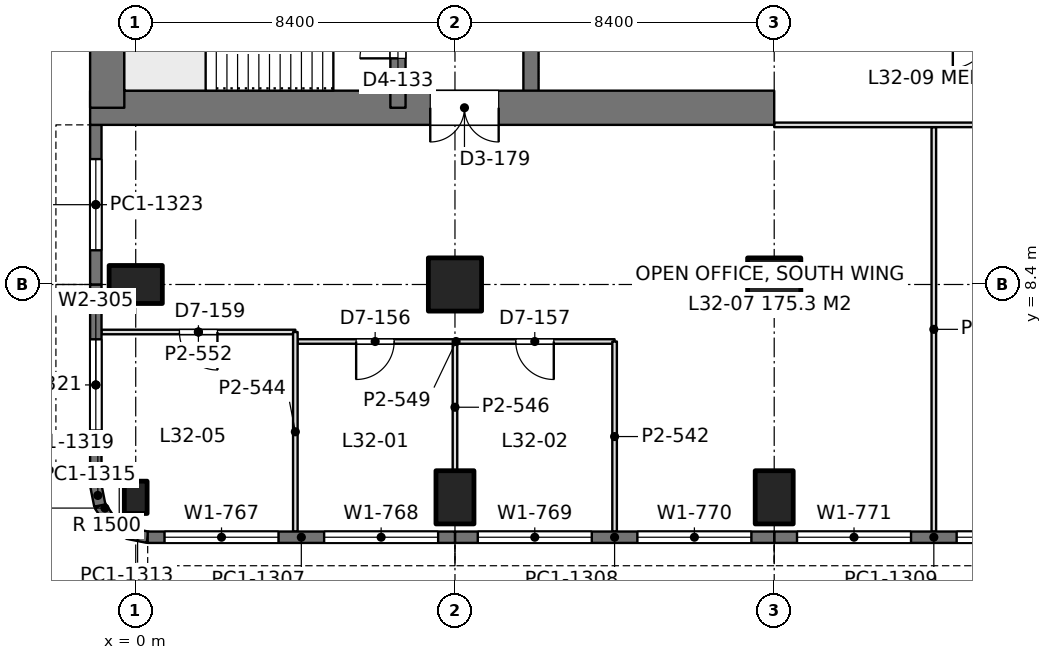
"""IFC4 building model, lengths in metres.
Left out: names, types, materials, properties, quantities, classifications, styles, units other than length and angle.
Written with IfcOpenShell. Run it as: python <this file> out.ifc"""

import sys

from ifc_helpers import new_model, si_unit, direction, frame, frame_2d, origin, origin_2d, place, context, subcontext, project, spatial, rectangle, extrude, element, fill, save


model = new_model("IFC4")
c1 = context("Model", 3, precision=1e-05, world=origin(), true_north=direction((0.0, 1.0)))
c2 = subcontext(c1, "Body", "Model", "MODEL_VIEW")
j1 = project(units=[si_unit("LENGTHUNIT", "METRE"), si_unit("PLANEANGLEUNIT", "RADIAN")], contexts=[c1])
p1 = place(None, origin())
s1 = spatial("IfcSite", under=j1, at=p1, CompositionType="ELEMENT")
p2 = place(p1, origin())
s2 = spatial("IfcBuilding", under=s1, at=p2, CompositionType="ELEMENT")
p3 = place(p2, frame((0.0, 0.0, 142.8)))
s3 = spatial("IfcBuildingStorey", under=s2, at=p3, CompositionType="ELEMENT", Elevation=142.8)
p4 = place(p3, frame((0.0, 2.8, 0.0), z_axis=(0.0, 0.0, 1.0), x_axis=(1.0, 0.0, 0.0)))
e1 = element("IfcColumn", 1, at=p4, inside=s3, PredefinedType="COLUMN", context=c2, shape_type="SweptSolid", body=[
    extrude(rectangle(XDim=0.6, YDim=0.85, at=origin_2d()), origin(), (0.0, 0.0, 1.0), 4.2),
])
for number, where, z_axis, x_axis in (
    (2, (0.0, 8.4, 0.0), (0.0, 0.0, 1.0), (0.0, 1.0, 0.0)),
    (3, (8.4, 2.8, 0.0), (0.0, 0.0, 1.0), (1.0, 0.0, 0.0)),
):
    element("IfcColumn", number, at=place(p3, frame(where, z_axis=z_axis, x_axis=x_axis)), inside=s3, PredefinedType="COLUMN", context=c2, shape_type="SweptSolid", body=[
        extrude(rectangle(XDim=1.0, YDim=1.4, at=origin_2d()), origin(), (0.0, 0.0, 1.0), 4.2),
    ])
p5 = place(p3, frame((8.4, 8.4, 0.0), z_axis=(0.0, 0.0, 1.0), x_axis=(1.0, 0.0, 0.0)))
e4 = element("IfcColumn", 4, at=p5, inside=s3, PredefinedType="COLUMN", context=c2, shape_type="SweptSolid", body=[
    extrude(rectangle(XDim=1.4, YDim=1.4, at=origin_2d()), origin(), (0.0, 0.0, 1.0), 4.2),
])
p6 = place(p3, frame((16.8, 2.8, 0.0), z_axis=(0.0, 0.0, 1.0), x_axis=(1.0, 0.0, 0.0)))
e5 = element("IfcColumn", 5, at=p6, inside=s3, PredefinedType="COLUMN", context=c2, shape_type="SweptSolid", body=[
    extrude(rectangle(XDim=1.0, YDim=1.4, at=origin_2d()), origin(), (0.0, 0.0, 1.0), 4.2),
])
p7 = place(p3, frame((16.8, 8.4, 0.0), z_axis=(0.0, 0.0, 1.0), x_axis=(1.0, 0.0, 0.0)))
e6 = element("IfcColumn", 6, at=p7, inside=s3, PredefinedType="COLUMN", context=c2, shape_type="SweptSolid", body=[
    extrude(rectangle(XDim=1.4, YDim=1.4, at=origin_2d()), origin(), (0.0, 0.0, 1.0), 4.2),
])
p8 = place(p3, frame((-1.2, 13.05, 0.0), z_axis=(0.0, 0.0, 1.0), x_axis=(1.0, 0.0, 0.0)))
e7 = element("IfcWall", 7, at=p8, inside=s3, PredefinedType="SHEAR", context=c2, shape_type="SweptSolid", body=[
    extrude(rectangle(XDim=18.0, YDim=0.9, at=frame_2d((9.0, 0.0))), origin(), (0.0, 0.0, 1.0), 4.2),
])
p9 = place(p8, frame((8.95, 0.0, 0.0)))
e8 = element("IfcOpeningElement", 8, at=p9, cuts=e7, PredefinedType="OPENING", context=c2, shape_type="SweptSolid", body=[
    extrude(rectangle(XDim=1.8, YDim=2.4, at=frame_2d((0.9, 1.2))), frame((0.0, 0.46, 0.0), z_axis=(0.0, -1.0, 0.0), x_axis=(1.0, 0.0, 0.0)), (0.0, 0.0, 1.0), 0.92),
])
p10 = place(p3, frame((-0.75, 13.05, 0.0), z_axis=(0.0, 0.0, 1.0), x_axis=(0.0, 1.0, 0.0)))
e9 = element("IfcWall", 9, at=p10, inside=s3, PredefinedType="SHEAR", context=c2, shape_type="SweptSolid", body=[
    extrude(rectangle(XDim=24.3, YDim=0.9, at=frame_2d((12.15, 0.0))), origin(), (0.0, 0.0, 1.0), 4.2),
])
p11 = place(p3, frame((6.9, 13.05, 0.0), z_axis=(0.0, 0.0, 1.0), x_axis=(0.0, 1.0, 0.0)))
e10 = element("IfcWall", 10, at=p11, inside=s3, PredefinedType="SHEAR", context=c2, shape_type="SweptSolid", body=[
    extrude(rectangle(XDim=24.3, YDim=0.4, at=frame_2d((12.15, 0.0))), origin(), (0.0, 0.0, 1.0), 4.2),
])
p12 = place(p11, frame((1.3, 0.0, 0.0)))
e11 = element("IfcOpeningElement", 11, at=p12, cuts=e10, PredefinedType="OPENING", context=c2, shape_type="SweptSolid", body=[
    extrude(rectangle(XDim=1.0, YDim=2.2, at=frame_2d((0.5, 1.1))), frame((0.0, 0.21, 0.0), z_axis=(0.0, -1.0, 0.0), x_axis=(1.0, 0.0, 0.0)), (0.0, 0.0, 1.0), 0.42),
])
p13 = place(p11, frame((22.0, 0.0, 0.0)))
e12 = element("IfcOpeningElement", 12, at=p13, cuts=e10, PredefinedType="OPENING", context=c2, shape_type="SweptSolid", body=[
    extrude(rectangle(XDim=1.0, YDim=2.2, at=frame_2d((0.5, 1.1))), frame((0.0, 0.21, 0.0), z_axis=(0.0, -1.0, 0.0), x_axis=(1.0, 0.0, 0.0)), (0.0, 0.0, 1.0), 0.42),
])
p14 = place(p11, frame((5.55, 0.0, 0.0)))
e13 = element("IfcOpeningElement", 13, at=p14, cuts=e10, PredefinedType="OPENING", context=c2, shape_type="SweptSolid", body=[
    extrude(rectangle(XDim=1.0, YDim=2.2, at=frame_2d((0.5, 1.1))), frame((0.0, 0.21, 0.0), z_axis=(0.0, -1.0, 0.0), x_axis=(1.0, 0.0, 0.0)), (0.0, 0.0, 1.0), 0.42),
])
p15 = place(p11, frame((9.55, 0.0, 0.0)))
e14 = element("IfcOpeningElement", 14, at=p15, cuts=e10, PredefinedType="OPENING", context=c2, shape_type="SweptSolid", body=[
    extrude(rectangle(XDim=1.0, YDim=2.2, at=frame_2d((0.5, 1.1))), frame((0.0, 0.21, 0.0), z_axis=(0.0, -1.0, 0.0), x_axis=(1.0, 0.0, 0.0)), (0.0, 0.0, 1.0), 0.42),
])
p16 = place(p11, frame((12.8, 0.0, 0.0)))
e15 = element("IfcOpeningElement", 15, at=p16, cuts=e10, PredefinedType="OPENING", context=c2, shape_type="SweptSolid", body=[
    extrude(rectangle(XDim=1.1, YDim=2.2, at=frame_2d((0.55, 1.1))), frame((0.0, 0.21, 0.0), z_axis=(0.0, -1.0, 0.0), x_axis=(1.0, 0.0, 0.0)), (0.0, 0.0, 1.0), 0.42),
])
p17 = place(p11, frame((15.538, 0.0, 0.0)))
e16 = element("IfcOpeningElement", 16, at=p17, cuts=e10, PredefinedType="OPENING", context=c2, shape_type="SweptSolid", body=[
    extrude(rectangle(XDim=1.1, YDim=2.2, at=frame_2d((0.55, 1.1))), frame((0.0, 0.21, 0.0), z_axis=(0.0, -1.0, 0.0), x_axis=(1.0, 0.0, 0.0)), (0.0, 0.0, 1.0), 0.42),
])
p18 = place(p11, frame((18.262, 0.0, 0.0)))
e17 = element("IfcOpeningElement", 17, at=p18, cuts=e10, PredefinedType="OPENING", context=c2, shape_type="SweptSolid", body=[
    extrude(rectangle(XDim=1.1, YDim=2.2, at=frame_2d((0.55, 1.1))), frame((0.0, 0.21, 0.0), z_axis=(0.0, -1.0, 0.0), x_axis=(1.0, 0.0, 0.0)), (0.0, 0.0, 1.0), 0.42),
])
p19 = place(p3, frame((10.4, 13.05, 0.0), z_axis=(0.0, 0.0, 1.0), x_axis=(0.0, 1.0, 0.0)))
e18 = element("IfcWall", 18, at=p19, inside=s3, PredefinedType="SHEAR", context=c2, shape_type="SweptSolid", body=[
    extrude(rectangle(XDim=24.3, YDim=0.4, at=frame_2d((12.15, 0.0))), origin(), (0.0, 0.0, 1.0), 4.2),
])
p20 = place(p19, frame((10.05, 0.0, 0.0)))
e19 = element("IfcOpeningElement", 19, at=p20, cuts=e18, PredefinedType="OPENING", context=c2, shape_type="SweptSolid", body=[
    extrude(rectangle(XDim=1.1, YDim=2.2, at=frame_2d((0.55, 1.1))), frame((0.0, 0.21, 0.0), z_axis=(0.0, -1.0, 0.0), x_axis=(1.0, 0.0, 0.0)), (0.0, 0.0, 1.0), 0.42),
])
p21 = place(p19, frame((12.9, 0.0, 0.0)))
e20 = element("IfcOpeningElement", 20, at=p21, cuts=e18, PredefinedType="OPENING", context=c2, shape_type="SweptSolid", body=[
    extrude(rectangle(XDim=1.1, YDim=2.2, at=frame_2d((0.55, 1.1))), frame((0.0, 0.21, 0.0), z_axis=(0.0, -1.0, 0.0), x_axis=(1.0, 0.0, 0.0)), (0.0, 0.0, 1.0), 0.42),
])
p22 = place(p19, frame((21.45, 0.0, 0.0)))
e21 = element("IfcOpeningElement", 21, at=p22, cuts=e18, PredefinedType="OPENING", context=c2, shape_type="SweptSolid", body=[
    extrude(rectangle(XDim=1.1, YDim=2.2, at=frame_2d((0.55, 1.1))), frame((0.0, 0.21, 0.0), z_axis=(0.0, -1.0, 0.0), x_axis=(1.0, 0.0, 0.0)), (0.0, 0.0, 1.0), 0.42),
])
p23 = place(p19, frame((2.25, 0.0, 0.0)))
e22 = element("IfcOpeningElement", 22, at=p23, cuts=e18, PredefinedType="OPENING", context=c2, shape_type="SweptSolid", body=[
    extrude(rectangle(XDim=1.8, YDim=2.4, at=frame_2d((0.9, 1.2))), frame((0.0, 0.21, 0.0), z_axis=(0.0, -1.0, 0.0), x_axis=(1.0, 0.0, 0.0)), (0.0, 0.0, 1.0), 0.42),
])
p24 = place(p19, frame((5.8, 0.0, 0.0)))
e23 = element("IfcOpeningElement", 23, at=p24, cuts=e18, PredefinedType="OPENING", context=c2, shape_type="SweptSolid", body=[
    extrude(rectangle(XDim=1.8, YDim=2.4, at=frame_2d((0.9, 1.2))), frame((0.0, 0.21, 0.0), z_axis=(0.0, -1.0, 0.0), x_axis=(1.0, 0.0, 0.0)), (0.0, 0.0, 1.0), 0.42),
])
p25 = place(p3, frame((25.2, 1.75, 0.0), z_axis=(0.0, 0.0, 1.0), x_axis=(-1.0, 0.0, 0.0)))
e24 = element("IfcWall", 24, at=p25, inside=s3, PredefinedType="SOLIDWALL", context=c2, shape_type="SweptSolid", body=[
    extrude(rectangle(XDim=8.4, YDim=0.3, at=frame_2d((4.2, 0.0))), origin(), (0.0, 0.0, 1.0), 4.05),
])
p26 = place(p25, frame((0.6, 0.0, 0.9)))
e25 = element("IfcOpeningElement", 25, at=p26, cuts=e24, PredefinedType="OPENING", context=c2, shape_type="SweptSolid", body=[
    extrude(rectangle(XDim=3.0, YDim=1.9, at=frame_2d((1.5, 0.95))), frame((0.0, 0.16, 0.0), z_axis=(0.0, -1.0, 0.0), x_axis=(1.0, 0.0, 0.0)), (0.0, 0.0, 1.0), 0.32),
])
p27 = place(p25, frame((4.8, 0.0, 0.9)))
e26 = element("IfcOpeningElement", 26, at=p27, cuts=e24, PredefinedType="OPENING", context=c2, shape_type="SweptSolid", body=[
    extrude(rectangle(XDim=3.0, YDim=1.9, at=frame_2d((1.5, 0.95))), frame((0.0, 0.16, 0.0), z_axis=(0.0, -1.0, 0.0), x_axis=(1.0, 0.0, 0.0)), (0.0, 0.0, 1.0), 0.32),
])
p28 = place(p3, frame((16.8, 1.75, 0.0), z_axis=(0.0, 0.0, 1.0), x_axis=(-1.0, 0.0, 0.0)))
e27 = element("IfcWall", 27, at=p28, inside=s3, PredefinedType="SOLIDWALL", context=c2, shape_type="SweptSolid", body=[
    extrude(rectangle(XDim=8.4, YDim=0.3, at=frame_2d((4.2, 0.0))), origin(), (0.0, 0.0, 1.0), 4.05),
])
p29 = place(p28, frame((0.6, 0.0, 0.9)))
e28 = element("IfcOpeningElement", 28, at=p29, cuts=e27, PredefinedType="OPENING", context=c2, shape_type="SweptSolid", body=[
    extrude(rectangle(XDim=3.0, YDim=1.9, at=frame_2d((1.5, 0.95))), frame((0.0, 0.16, 0.0), z_axis=(0.0, -1.0, 0.0), x_axis=(1.0, 0.0, 0.0)), (0.0, 0.0, 1.0), 0.32),
])
p30 = place(p28, frame((4.8, 0.0, 0.9)))
e29 = element("IfcOpeningElement", 29, at=p30, cuts=e27, PredefinedType="OPENING", context=c2, shape_type="SweptSolid", body=[
    extrude(rectangle(XDim=3.0, YDim=1.9, at=frame_2d((1.5, 0.95))), frame((0.0, 0.16, 0.0), z_axis=(0.0, -1.0, 0.0), x_axis=(1.0, 0.0, 0.0)), (0.0, 0.0, 1.0), 0.32),
])
p31 = place(p3, frame((8.4, 1.75, 0.0), z_axis=(0.0, 0.0, 1.0), x_axis=(-1.0, 0.0, 0.0)))
e30 = element("IfcWall", 30, at=p31, inside=s3, PredefinedType="SOLIDWALL", context=c2, shape_type="SweptSolid", body=[
    extrude(rectangle(XDim=8.085, YDim=0.3, at=frame_2d((4.042, 0.0))), origin(), (0.0, 0.0, 1.0), 4.05),
])
p32 = place(p31, frame((0.443, 0.0, 0.9)))
e31 = element("IfcOpeningElement", 31, at=p32, cuts=e30, PredefinedType="OPENING", context=c2, shape_type="SweptSolid", body=[
    extrude(rectangle(XDim=3.0, YDim=1.9, at=frame_2d((1.5, 0.95))), frame((0.0, 0.16, 0.0), z_axis=(0.0, -1.0, 0.0), x_axis=(1.0, 0.0, 0.0)), (0.0, 0.0, 1.0), 0.32),
])
p33 = place(p31, frame((4.643, 0.0, 0.9)))
e32 = element("IfcOpeningElement", 32, at=p33, cuts=e30, PredefinedType="OPENING", context=c2, shape_type="SweptSolid", body=[
    extrude(rectangle(XDim=3.0, YDim=1.9, at=frame_2d((1.5, 0.95))), frame((0.0, 0.16, 0.0), z_axis=(0.0, -1.0, 0.0), x_axis=(1.0, 0.0, 0.0)), (0.0, 0.0, 1.0), 0.32),
])
p34 = place(p3, frame((0.315, 1.75, 0.0), z_axis=(0.0, 0.0, 1.0), x_axis=(-0.980788534345, 0.195073962632, 0.0)))
e33 = element("IfcWall", 33, at=p34, inside=s3, PredefinedType="SOLIDWALL", context=c2, shape_type="SweptSolid", body=[
    extrude(rectangle(XDim=0.541, YDim=0.3, at=frame_2d((0.271, 0.0))), origin(), (0.0, 0.0, 1.0), 4.05),
])
for number, where, z_axis, x_axis in (
    (34, (-0.216, 1.855, 0.0), (0.0, 0.0, 1.0), (-0.831, 0.556, 0.0)),
    (35, (-0.653, 2.147, 0.0), (0.0, 0.0, 1.0), (-0.556, 0.831, 0.0)),
):
    element("IfcWall", number, at=place(p3, frame(where, z_axis=z_axis, x_axis=x_axis)), inside=s3, PredefinedType="SOLIDWALL", context=c2, shape_type="SweptSolid", body=[
        extrude(rectangle(XDim=0.526, YDim=0.3, at=frame_2d((0.263, 0.0))), origin(), (0.0, 0.0, 1.0), 4.05),
    ])
p35 = place(p3, frame((-0.945, 2.584, 0.0), z_axis=(0.0, 0.0, 1.0), x_axis=(-0.195073962632, 0.980788534345, 0.0)))
e36 = element("IfcWall", 36, at=p35, inside=s3, PredefinedType="SOLIDWALL", context=c2, shape_type="SweptSolid", body=[
    extrude(rectangle(XDim=0.541, YDim=0.3, at=frame_2d((0.271, 0.0))), origin(), (0.0, 0.0, 1.0), 4.05),
])
p36 = place(p3, frame((-1.05, 3.115, 0.0), z_axis=(0.0, 0.0, 1.0), x_axis=(0.0, 1.0, 0.0)))
e37 = element("IfcWall", 37, at=p36, inside=s3, PredefinedType="SOLIDWALL", context=c2, shape_type="SweptSolid", body=[
    extrude(rectangle(XDim=5.285, YDim=0.3, at=frame_2d((2.643, 0.0))), origin(), (0.0, 0.0, 1.0), 4.05),
])
p37 = place(p36, frame((1.443, 0.0, 0.9)))
e38 = element("IfcOpeningElement", 38, at=p37, cuts=e37, PredefinedType="OPENING", context=c2, shape_type="SweptSolid", body=[
    extrude(rectangle(XDim=2.4, YDim=1.9, at=frame_2d((1.2, 0.95))), frame((0.0, 0.16, 0.0), z_axis=(0.0, -1.0, 0.0), x_axis=(1.0, 0.0, 0.0)), (0.0, 0.0, 1.0), 0.32),
])
p38 = place(p3, frame((-1.05, 8.4, 0.0), z_axis=(0.0, 0.0, 1.0), x_axis=(0.0, 1.0, 0.0)))
e39 = element("IfcWall", 39, at=p38, inside=s3, PredefinedType="SOLIDWALL", context=c2, shape_type="SweptSolid", body=[
    extrude(rectangle(XDim=4.2, YDim=0.3, at=frame_2d((2.1, 0.0))), origin(), (0.0, 0.0, 1.0), 4.05),
])
p39 = place(p38, frame((0.9, 0.0, 0.9)))
e40 = element("IfcOpeningElement", 40, at=p39, cuts=e39, PredefinedType="OPENING", context=c2, shape_type="SweptSolid", body=[
    extrude(rectangle(XDim=2.4, YDim=1.9, at=frame_2d((1.2, 0.95))), frame((0.0, 0.16, 0.0), z_axis=(0.0, -1.0, 0.0), x_axis=(1.0, 0.0, 0.0)), (0.0, 0.0, 1.0), 0.32),
])
p40 = place(p3, frame((-0.902, 7.15, 0.0), z_axis=(0.0, 0.0, 1.0), x_axis=(1.0, 0.0, 0.0)))
e41 = element("IfcWall", 41, at=p40, inside=s3, PredefinedType="PARTITIONING", context=c2, shape_type="SweptSolid", body=[
    extrude(rectangle(XDim=5.102, YDim=0.12, at=frame_2d((2.551, 0.0))), origin(), (0.0, 0.0, 1.0), 3.56),
])
p41 = place(p40, frame((2.052, 0.0, 0.0)))
e42 = element("IfcOpeningElement", 42, at=p41, cuts=e41, PredefinedType="OPENING", context=c2, shape_type="SweptSolid", body=[
    extrude(rectangle(XDim=1.0, YDim=2.4, at=frame_2d((0.5, 1.2))), frame((0.0, 0.07, 0.0), z_axis=(0.0, -1.0, 0.0), x_axis=(1.0, 0.0, 0.0)), (0.0, 0.0, 1.0), 0.14),
])
p42 = place(p3, frame((4.258, 6.9, 0.0), z_axis=(0.0, 0.0, 1.0), x_axis=(1.0, 0.0, 0.0)))
e43 = element("IfcWall", 43, at=p42, inside=s3, PredefinedType="PARTITIONING", context=c2, shape_type="SweptSolid", body=[
    extrude(rectangle(XDim=8.342, YDim=0.12, at=frame_2d((4.171, 0.0))), origin(), (0.0, 0.0, 1.0), 3.55),
])
p43 = place(p42, frame((1.542, 0.0, 0.0)))
e44 = element("IfcOpeningElement", 44, at=p43, cuts=e43, PredefinedType="OPENING", context=c2, shape_type="SweptSolid", body=[
    extrude(rectangle(XDim=1.0, YDim=2.4, at=frame_2d((0.5, 1.2))), frame((0.0, 0.07, 0.0), z_axis=(0.0, -1.0, 0.0), x_axis=(1.0, 0.0, 0.0)), (0.0, 0.0, 1.0), 0.14),
])
p44 = place(p42, frame((5.742, 0.0, 0.0)))
e45 = element("IfcOpeningElement", 45, at=p44, cuts=e43, PredefinedType="OPENING", context=c2, shape_type="SweptSolid", body=[
    extrude(rectangle(XDim=1.0, YDim=2.4, at=frame_2d((0.5, 1.2))), frame((0.0, 0.07, 0.0), z_axis=(0.0, -1.0, 0.0), x_axis=(1.0, 0.0, 0.0)), (0.0, 0.0, 1.0), 0.14),
])
p45 = place(p3, frame((4.2, 1.898, 0.0), z_axis=(0.0, 0.0, 1.0), x_axis=(0.0, 1.0, 0.0)))
e46 = element("IfcWall", 46, at=p45, inside=s3, PredefinedType="PARTITIONING", context=c2, shape_type="SweptSolid", body=[
    extrude(rectangle(XDim=5.252, YDim=0.12, at=frame_2d((2.626, 0.0))), origin(), (0.0, 0.0, 1.0), 3.56),
])
p46 = place(p3, frame((8.4, 3.499, 0.0), z_axis=(0.0, 0.0, 1.0), x_axis=(0.0, 1.0, 0.0)))
e47 = element("IfcWall", 47, at=p46, inside=s3, PredefinedType="PARTITIONING", context=c2, shape_type="SweptSolid", body=[
    extrude(rectangle(XDim=3.343, YDim=0.12, at=frame_2d((1.671, 0.0))), origin(), (0.0, 0.0, 1.0), 3.55),
])
p47 = place(p3, frame((12.6, 1.898, 0.0), z_axis=(0.0, 0.0, 1.0), x_axis=(0.0, 1.0, 0.0)))
e48 = element("IfcWall", 48, at=p47, inside=s3, PredefinedType="PARTITIONING", context=c2, shape_type="SweptSolid", body=[
    extrude(rectangle(XDim=5.002, YDim=0.12, at=frame_2d((2.501, 0.0))), origin(), (0.0, 0.0, 1.0), 3.56),
])
p48 = place(p3, frame((21.0, 1.898, 0.0), z_axis=(0.0, 0.0, 1.0), x_axis=(0.0, 1.0, 0.0)))
e49 = element("IfcWall", 49, at=p48, inside=s3, PredefinedType="PARTITIONING", context=c2, shape_type="SweptSolid", body=[
    extrude(rectangle(XDim=10.644, YDim=0.12, at=frame_2d((5.322, 0.0))), origin(), (0.0, 0.0, 1.0), 3.55),
])
p49 = place(p3, frame((16.8, 12.6, 0.0), z_axis=(0.0, 0.0, 1.0), x_axis=(1.0, 0.0, 0.0)))
e50 = element("IfcWall", 50, at=p49, inside=s3, PredefinedType="PARTITIONING", context=c2, shape_type="SweptSolid", body=[
    extrude(rectangle(XDim=16.8, YDim=0.12, at=frame_2d((8.4, 0.0))), origin(), (0.0, 0.0, 1.0), 3.55),
])
p50 = place(p26, origin())
e51 = element("IfcWindow", 51, at=p50, inside=s3, PartitioningType="SINGLE_PANEL", PredefinedType="WINDOW", context=c2, shape_type="SweptSolid", body=[
    extrude(rectangle(XDim=3.0, YDim=1.9, at=frame_2d((1.5, 0.95))), frame((0.0, 0.03, 0.0), z_axis=(0.0, -1.0, 0.0), x_axis=(1.0, 0.0, 0.0)), (0.0, 0.0, 1.0), 0.06),
])
fill(e25, e51)
p51 = place(p27, origin())
e52 = element("IfcWindow", 52, at=p51, inside=s3, PartitioningType="SINGLE_PANEL", PredefinedType="WINDOW", context=c2, shape_type="SweptSolid", body=[
    extrude(rectangle(XDim=3.0, YDim=1.9, at=frame_2d((1.5, 0.95))), frame((0.0, 0.03, 0.0), z_axis=(0.0, -1.0, 0.0), x_axis=(1.0, 0.0, 0.0)), (0.0, 0.0, 1.0), 0.06),
])
fill(e26, e52)
p52 = place(p29, origin())
e53 = element("IfcWindow", 53, at=p52, inside=s3, PartitioningType="SINGLE_PANEL", PredefinedType="WINDOW", context=c2, shape_type="SweptSolid", body=[
    extrude(rectangle(XDim=3.0, YDim=1.9, at=frame_2d((1.5, 0.95))), frame((0.0, 0.03, 0.0), z_axis=(0.0, -1.0, 0.0), x_axis=(1.0, 0.0, 0.0)), (0.0, 0.0, 1.0), 0.06),
])
fill(e28, e53)
p53 = place(p30, origin())
e54 = element("IfcWindow", 54, at=p53, inside=s3, PartitioningType="SINGLE_PANEL", PredefinedType="WINDOW", context=c2, shape_type="SweptSolid", body=[
    extrude(rectangle(XDim=3.0, YDim=1.9, at=frame_2d((1.5, 0.95))), frame((0.0, 0.03, 0.0), z_axis=(0.0, -1.0, 0.0), x_axis=(1.0, 0.0, 0.0)), (0.0, 0.0, 1.0), 0.06),
])
fill(e29, e54)
p54 = place(p32, origin())
e55 = element("IfcWindow", 55, at=p54, inside=s3, PartitioningType="SINGLE_PANEL", PredefinedType="WINDOW", context=c2, shape_type="SweptSolid", body=[
    extrude(rectangle(XDim=3.0, YDim=1.9, at=frame_2d((1.5, 0.95))), frame((0.0, 0.03, 0.0), z_axis=(0.0, -1.0, 0.0), x_axis=(1.0, 0.0, 0.0)), (0.0, 0.0, 1.0), 0.06),
])
fill(e31, e55)
p55 = place(p33, origin())
e56 = element("IfcWindow", 56, at=p55, inside=s3, PartitioningType="SINGLE_PANEL", PredefinedType="WINDOW", context=c2, shape_type="SweptSolid", body=[
    extrude(rectangle(XDim=3.0, YDim=1.9, at=frame_2d((1.5, 0.95))), frame((0.0, 0.03, 0.0), z_axis=(0.0, -1.0, 0.0), x_axis=(1.0, 0.0, 0.0)), (0.0, 0.0, 1.0), 0.06),
])
fill(e32, e56)
p56 = place(p37, origin())
e57 = element("IfcWindow", 57, at=p56, inside=s3, PartitioningType="SINGLE_PANEL", PredefinedType="WINDOW", context=c2, shape_type="SweptSolid", body=[
    extrude(rectangle(XDim=2.4, YDim=1.9, at=frame_2d((1.2, 0.95))), frame((0.0, 0.03, 0.0), z_axis=(0.0, -1.0, 0.0), x_axis=(1.0, 0.0, 0.0)), (0.0, 0.0, 1.0), 0.06),
])
fill(e38, e57)
p57 = place(p39, origin())
e58 = element("IfcWindow", 58, at=p57, inside=s3, PartitioningType="SINGLE_PANEL", PredefinedType="WINDOW", context=c2, shape_type="SweptSolid", body=[
    extrude(rectangle(XDim=2.4, YDim=1.9, at=frame_2d((1.2, 0.95))), frame((0.0, 0.03, 0.0), z_axis=(0.0, -1.0, 0.0), x_axis=(1.0, 0.0, 0.0)), (0.0, 0.0, 1.0), 0.06),
])
fill(e40, e58)
p58 = place(p9, frame((1.8, 0.0, 0.0), z_axis=(0.0, 0.0, 1.0), x_axis=(-1.0, 0.0, 0.0)))
e59 = element("IfcDoor", 59, at=p58, inside=s3, OperationType="DOUBLE_DOOR_SINGLE_SWING", PredefinedType="DOOR", context=c2, shape_type="SweptSolid", body=[
    extrude(rectangle(XDim=1.8, YDim=2.4, at=frame_2d((0.9, 1.2))), frame((0.0, 0.025, 0.0), z_axis=(0.0, -1.0, 0.0), x_axis=(1.0, 0.0, 0.0)), (0.0, 0.0, 1.0), 0.05),
])
fill(e8, e59)
p59 = place(p12, origin())
e60 = element("IfcDoor", 60, at=p59, inside=s3, OperationType="SINGLE_SWING_LEFT", PredefinedType="DOOR", context=c2, shape_type="SweptSolid", body=[
    extrude(rectangle(XDim=1.0, YDim=2.2, at=frame_2d((0.5, 1.1))), frame((0.0, 0.025, 0.0), z_axis=(0.0, -1.0, 0.0), x_axis=(1.0, 0.0, 0.0)), (0.0, 0.0, 1.0), 0.05),
])
fill(e11, e60)
p60 = place(p41, frame((1.0, 0.0, 0.0), z_axis=(0.0, 0.0, 1.0), x_axis=(-1.0, 0.0, 0.0)))
e61 = element("IfcDoor", 61, at=p60, inside=s3, OperationType="SINGLE_SWING_LEFT", PredefinedType="DOOR", context=c2, shape_type="SweptSolid", body=[
    extrude(rectangle(XDim=1.0, YDim=2.4, at=frame_2d((0.5, 1.2))), frame((0.0, 0.025, 0.0), z_axis=(0.0, -1.0, 0.0), x_axis=(1.0, 0.0, 0.0)), (0.0, 0.0, 1.0), 0.05),
])
fill(e42, e61)
p61 = place(p43, frame((1.0, 0.0, 0.0), z_axis=(0.0, 0.0, 1.0), x_axis=(-1.0, 0.0, 0.0)))
e62 = element("IfcDoor", 62, at=p61, inside=s3, OperationType="SINGLE_SWING_RIGHT", PredefinedType="DOOR", context=c2, shape_type="SweptSolid", body=[
    extrude(rectangle(XDim=1.0, YDim=2.4, at=frame_2d((0.5, 1.2))), frame((0.0, 0.025, 0.0), z_axis=(0.0, -1.0, 0.0), x_axis=(1.0, 0.0, 0.0)), (0.0, 0.0, 1.0), 0.05),
])
fill(e44, e62)
p62 = place(p44, frame((1.0, 0.0, 0.0), z_axis=(0.0, 0.0, 1.0), x_axis=(-1.0, 0.0, 0.0)))
e63 = element("IfcDoor", 63, at=p62, inside=s3, OperationType="SINGLE_SWING_LEFT", PredefinedType="DOOR", context=c2, shape_type="SweptSolid", body=[
    extrude(rectangle(XDim=1.0, YDim=2.4, at=frame_2d((0.5, 1.2))), frame((0.0, 0.025, 0.0), z_axis=(0.0, -1.0, 0.0), x_axis=(1.0, 0.0, 0.0)), (0.0, 0.0, 1.0), 0.05),
])
fill(e45, e63)
save(model, sys.argv[1])
